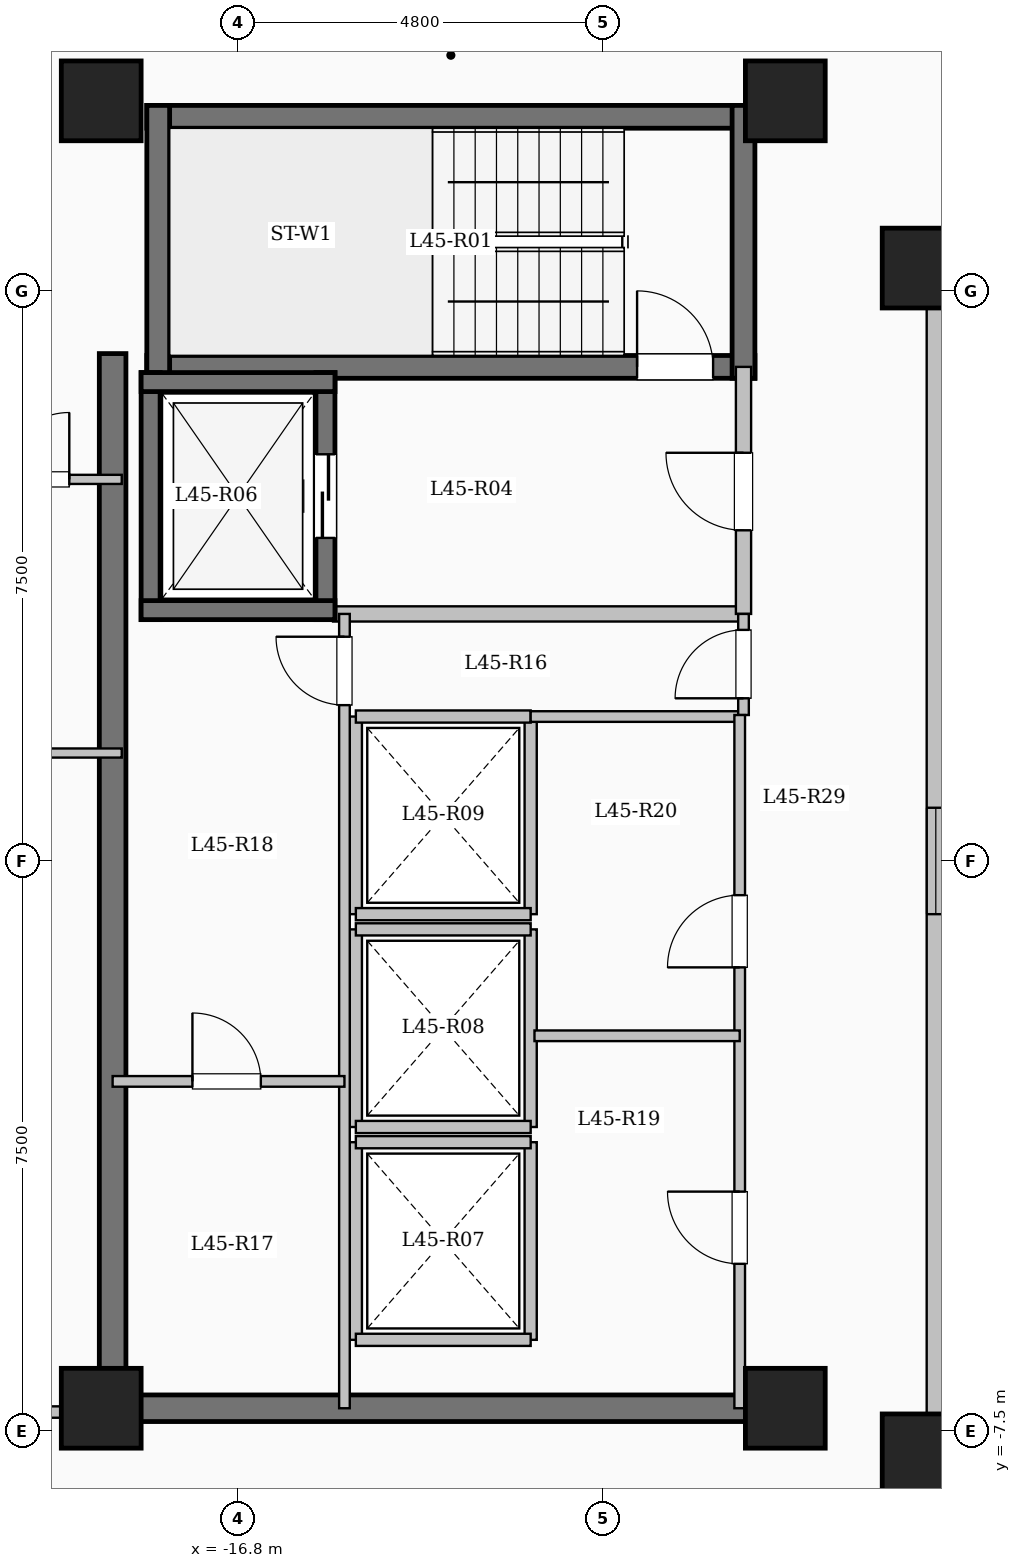
"""IFC4 building model, lengths in metres.
Left out: names, types, materials, properties, quantities, classifications, styles, units other than length and angle.
Written with IfcOpenShell. Run it as: python <this file> out.ifc"""

import sys

from ifc_helpers import new_model, si_unit, direction, frame, frame_2d, origin, origin_2d, place, context, subcontext, project, spatial, rectangle, extrude, element, fill, save


model = new_model("IFC4")
c1 = context("Model", 3, precision=1e-05, world=origin(), true_north=direction((0.0, 1.0)))
c2 = subcontext(c1, "Body", "Model", "MODEL_VIEW")
j1 = project(units=[si_unit("LENGTHUNIT", "METRE"), si_unit("PLANEANGLEUNIT", "RADIAN")], contexts=[c1])
p1 = place(None, origin())
s1 = spatial("IfcSite", under=j1, at=p1, CompositionType="ELEMENT")
p2 = place(p1, origin())
s2 = spatial("IfcBuilding", under=s1, at=p2, CompositionType="ELEMENT")
p3 = place(p2, frame((0.0, 0.0, 166.1)))
s3 = spatial("IfcBuildingStorey", under=s2, at=p3, CompositionType="ELEMENT", Elevation=166.1)
for number, where, z_axis, x_axis in (
    (1, (-7.8, -7.8, 0.0), (0.0, 0.0, 1.0), (1.0, 0.0, 0.0)),
    (2, (-7.8, 7.8, 0.0), (0.0, 0.0, 1.0), (1.0, 0.0, 0.0)),
    (3, (-9.6, -7.2, 0.0), (0.0, 0.0, 1.0), (1.0, 0.0, 0.0)),
    (4, (-9.6, 10.0, 0.0), (0.0, 0.0, 1.0), (1.0, 0.0, 0.0)),
    (5, (-18.6, -7.2, 0.0), (0.0, 0.0, 1.0), (1.0, 0.0, 0.0)),
    (6, (-18.6, 10.0, 0.0), (0.0, 0.0, 1.0), (1.0, 0.0, 0.0)),
):
    element("IfcColumn", number, at=place(p3, frame(where, z_axis=z_axis, x_axis=x_axis)), inside=s3, PredefinedType="COLUMN", context=c2, shape_type="SweptSolid", body=[
        extrude(rectangle(XDim=1.05, YDim=1.05, at=origin_2d()), origin(), (0.0, 0.0, 1.0), 3.35),
    ])
p4 = place(p3, frame((-7.62, -7.62, 0.0), z_axis=(0.0, 0.0, 1.0), x_axis=(1.0, 0.0, 0.0)))
e7 = element("IfcWall", 7, at=p4, inside=s3, PredefinedType="SOLIDWALL", context=c2, shape_type="SweptSolid", body=[
    extrude(rectangle(XDim=15.24, YDim=0.24, at=frame_2d((7.62, 0.0))), origin(), (0.0, 0.0, 1.0), 3.1),
])
p5 = place(p4, frame((6.92, 0.0, 0.95)))
e8 = element("IfcOpeningElement", 8, at=p5, cuts=e7, PredefinedType="OPENING", context=c2, shape_type="SweptSolid", body=[
    extrude(rectangle(XDim=1.4, YDim=1.5, at=frame_2d((0.7, 0.75))), frame((0.0, 0.13, 0.0), z_axis=(0.0, -1.0, 0.0), x_axis=(1.0, 0.0, 0.0)), (0.0, 0.0, 1.0), 0.26),
])
p6 = place(p3, frame((7.62, 7.62, 0.0), z_axis=(0.0, 0.0, 1.0), x_axis=(-1.0, 0.0, 0.0)))
e9 = element("IfcWall", 9, at=p6, inside=s3, PredefinedType="SOLIDWALL", context=c2, shape_type="SweptSolid", body=[
    extrude(rectangle(XDim=15.24, YDim=0.24, at=frame_2d((7.62, 0.0))), origin(), (0.0, 0.0, 1.0), 3.1),
])
p7 = place(p6, frame((6.92, 0.0, 0.95)))
e10 = element("IfcOpeningElement", 10, at=p7, cuts=e9, PredefinedType="OPENING", context=c2, shape_type="SweptSolid", body=[
    extrude(rectangle(XDim=1.4, YDim=1.5, at=frame_2d((0.7, 0.75))), frame((0.0, 0.13, 0.0), z_axis=(0.0, -1.0, 0.0), x_axis=(1.0, 0.0, 0.0)), (0.0, 0.0, 1.0), 0.26),
])
p8 = place(p3, frame((-7.62, 7.62, 0.0), z_axis=(0.0, 0.0, 1.0), x_axis=(0.0, -1.0, 0.0)))
e11 = element("IfcWall", 11, at=p8, inside=s3, PredefinedType="SOLIDWALL", context=c2, shape_type="SweptSolid", body=[
    extrude(rectangle(XDim=15.24, YDim=0.24, at=frame_2d((7.62, 0.0))), origin(), (0.0, 0.0, 1.0), 3.1),
])
p9 = place(p8, frame((6.92, 0.0, 0.95)))
e12 = element("IfcOpeningElement", 12, at=p9, cuts=e11, PredefinedType="OPENING", context=c2, shape_type="SweptSolid", body=[
    extrude(rectangle(XDim=1.4, YDim=1.5, at=frame_2d((0.7, 0.75))), frame((0.0, 0.13, 0.0), z_axis=(0.0, -1.0, 0.0), x_axis=(1.0, 0.0, 0.0)), (0.0, 0.0, 1.0), 0.26),
])
p10 = place(p3, frame((-18.0, 9.79, 0.0), z_axis=(0.0, 0.0, 1.0), x_axis=(1.0, 0.0, 0.0)))
e13 = element("IfcWall", 13, at=p10, inside=s3, PredefinedType="SHEAR", context=c2, shape_type="SweptSolid", body=[
    extrude(rectangle(XDim=8.0, YDim=0.3, at=frame_2d((4.0, 0.0))), origin(), (0.0, 0.0, 1.0), 3.35),
])
p11 = place(p3, frame((-18.0, 6.5, 0.0), z_axis=(0.0, 0.0, 1.0), x_axis=(1.0, 0.0, 0.0)))
e14 = element("IfcWall", 14, at=p11, inside=s3, PredefinedType="SHEAR", context=c2, shape_type="SweptSolid", body=[
    extrude(rectangle(XDim=8.0, YDim=0.3, at=frame_2d((4.0, 0.0))), origin(), (0.0, 0.0, 1.0), 3.35),
])
p12 = place(p11, frame((6.45, 0.0, 0.0)))
e15 = element("IfcOpeningElement", 15, at=p12, cuts=e14, PredefinedType="OPENING", context=c2, shape_type="SweptSolid", body=[
    extrude(rectangle(XDim=1.0, YDim=2.15, at=frame_2d((0.5, 1.075))), frame((0.0, 0.16, 0.0), z_axis=(0.0, -1.0, 0.0), x_axis=(1.0, 0.0, 0.0)), (0.0, 0.0, 1.0), 0.32),
])
for number, where, z_axis, x_axis in (
    (16, (-17.85, 6.35, 0.0), (0.0, 0.0, 1.0), (0.0, 1.0, 0.0)),
    (17, (-10.15, 6.35, 0.0), (0.0, 0.0, 1.0), (0.0, 1.0, 0.0)),
):
    element("IfcWall", number, at=place(p3, frame(where, z_axis=z_axis, x_axis=x_axis)), inside=s3, PredefinedType="SHEAR", context=c2, shape_type="SweptSolid", body=[
        extrude(rectangle(XDim=3.59, YDim=0.3, at=frame_2d((1.795, 0.0))), origin(), (0.0, 0.0, 1.0), 3.35),
    ])
p13 = place(p3, frame((-15.55, 3.25, 0.0), z_axis=(0.0, 0.0, 1.0), x_axis=(1.0, 0.0, 0.0)))
e18 = element("IfcWall", 18, at=p13, inside=s3, PredefinedType="SOLIDWALL", context=c2, shape_type="SweptSolid", body=[
    extrude(rectangle(XDim=5.4, YDim=0.2, at=frame_2d((2.7, 0.0))), origin(), (0.0, 0.0, 1.0), 3.1),
])
p14 = place(p3, frame((-10.15, 3.25, 0.0), z_axis=(0.0, 0.0, 1.0), x_axis=(0.0, 1.0, 0.0)))
e19 = element("IfcWall", 19, at=p14, inside=s3, PredefinedType="SOLIDWALL", context=c2, shape_type="SweptSolid", body=[
    extrude(rectangle(XDim=3.25, YDim=0.2, at=frame_2d((1.625, 0.0))), origin(), (0.0, 0.0, 1.0), 3.1),
])
p15 = place(p14, frame((1.1, 0.0, 0.0)))
e20 = element("IfcOpeningElement", 20, at=p15, cuts=e19, PredefinedType="OPENING", context=c2, shape_type="SweptSolid", body=[
    extrude(rectangle(XDim=1.02, YDim=2.15, at=frame_2d((0.51, 1.075))), frame((0.0, 0.11, 0.0), z_axis=(0.0, -1.0, 0.0), x_axis=(1.0, 0.0, 0.0)), (0.0, 0.0, 1.0), 0.22),
])
p16 = place(p3, frame((-17.95, 3.175, 0.0), z_axis=(0.0, 0.0, 1.0), x_axis=(0.0, 1.0, 0.0)))
e21 = element("IfcWall", 21, at=p16, inside=s3, PredefinedType="SHEAR", context=c2, shape_type="SweptSolid", body=[
    extrude(rectangle(XDim=3.25, YDim=0.25, at=frame_2d((1.625, 0.0))), origin(), (0.0, 0.0, 1.0), 3.35),
])
p17 = place(p3, frame((-15.65, 3.175, 0.0), z_axis=(0.0, 0.0, 1.0), x_axis=(0.0, 1.0, 0.0)))
e22 = element("IfcWall", 22, at=p17, inside=s3, PredefinedType="SHEAR", context=c2, shape_type="SweptSolid", body=[
    extrude(rectangle(XDim=3.25, YDim=0.25, at=frame_2d((1.625, 0.0))), origin(), (0.0, 0.0, 1.0), 3.35),
])
p18 = place(p17, frame((1.075, 0.0, 0.0)))
e23 = element("IfcOpeningElement", 23, at=p18, cuts=e22, PredefinedType="OPENING", context=c2, shape_type="SweptSolid", body=[
    extrude(rectangle(XDim=1.1, YDim=2.15, at=frame_2d((0.55, 1.075))), frame((0.0, 0.135, 0.0), z_axis=(0.0, -1.0, 0.0), x_axis=(1.0, 0.0, 0.0)), (0.0, 0.0, 1.0), 0.27),
])
for number, where, z_axis, x_axis in (
    (24, (-18.075, 3.3, 0.0), (0.0, 0.0, 1.0), (1.0, 0.0, 0.0)),
    (25, (-18.075, 6.3, 0.0), (0.0, 0.0, 1.0), (1.0, 0.0, 0.0)),
):
    element("IfcWall", number, at=place(p3, frame(where, z_axis=z_axis, x_axis=x_axis)), inside=s3, PredefinedType="SHEAR", context=c2, shape_type="SweptSolid", body=[
        extrude(rectangle(XDim=2.55, YDim=0.25, at=frame_2d((1.275, 0.0))), origin(), (0.0, 0.0, 1.0), 3.35),
    ])
for number, where, z_axis, x_axis in (
    (26, (-15.25, -6.3, 0.0), (0.0, 0.0, 1.0), (0.0, 1.0, 0.0)),
    (27, (-12.95, -6.3, 0.0), (0.0, 0.0, 1.0), (0.0, 1.0, 0.0)),
):
    element("IfcWall", number, at=place(p3, frame(where, z_axis=z_axis, x_axis=x_axis)), inside=s3, PredefinedType="SOLIDWALL", context=c2, shape_type="SweptSolid", body=[
        extrude(rectangle(XDim=2.6, YDim=0.16, at=frame_2d((1.3, 0.0))), origin(), (0.0, 0.0, 1.0), 3.1),
    ])
for number, where, z_axis, x_axis in (
    (28, (-15.25, -6.3, 0.0), (0.0, 0.0, 1.0), (1.0, 0.0, 0.0)),
    (29, (-15.25, -3.7, 0.0), (0.0, 0.0, 1.0), (1.0, 0.0, 0.0)),
):
    element("IfcWall", number, at=place(p3, frame(where, z_axis=z_axis, x_axis=x_axis)), inside=s3, PredefinedType="SOLIDWALL", context=c2, shape_type="SweptSolid", body=[
        extrude(rectangle(XDim=2.3, YDim=0.16, at=frame_2d((1.15, 0.0))), origin(), (0.0, 0.0, 1.0), 3.1),
    ])
for number, where, z_axis, x_axis in (
    (30, (-15.25, -3.5, 0.0), (0.0, 0.0, 1.0), (0.0, 1.0, 0.0)),
    (31, (-12.95, -3.5, 0.0), (0.0, 0.0, 1.0), (0.0, 1.0, 0.0)),
):
    element("IfcWall", number, at=place(p3, frame(where, z_axis=z_axis, x_axis=x_axis)), inside=s3, PredefinedType="SOLIDWALL", context=c2, shape_type="SweptSolid", body=[
        extrude(rectangle(XDim=2.6, YDim=0.16, at=frame_2d((1.3, 0.0))), origin(), (0.0, 0.0, 1.0), 3.1),
    ])
for number, where, z_axis, x_axis in (
    (32, (-15.25, -3.5, 0.0), (0.0, 0.0, 1.0), (1.0, 0.0, 0.0)),
    (33, (-15.25, -0.9, 0.0), (0.0, 0.0, 1.0), (1.0, 0.0, 0.0)),
):
    element("IfcWall", number, at=place(p3, frame(where, z_axis=z_axis, x_axis=x_axis)), inside=s3, PredefinedType="SOLIDWALL", context=c2, shape_type="SweptSolid", body=[
        extrude(rectangle(XDim=2.3, YDim=0.16, at=frame_2d((1.15, 0.0))), origin(), (0.0, 0.0, 1.0), 3.1),
    ])
for number, where, z_axis, x_axis in (
    (34, (-15.25, -0.7, 0.0), (0.0, 0.0, 1.0), (0.0, 1.0, 0.0)),
    (35, (-12.95, -0.7, 0.0), (0.0, 0.0, 1.0), (0.0, 1.0, 0.0)),
):
    element("IfcWall", number, at=place(p3, frame(where, z_axis=z_axis, x_axis=x_axis)), inside=s3, PredefinedType="SOLIDWALL", context=c2, shape_type="SweptSolid", body=[
        extrude(rectangle(XDim=2.6, YDim=0.16, at=frame_2d((1.3, 0.0))), origin(), (0.0, 0.0, 1.0), 3.1),
    ])
for number, where, z_axis, x_axis in (
    (36, (-15.25, -0.7, 0.0), (0.0, 0.0, 1.0), (1.0, 0.0, 0.0)),
    (37, (-15.25, 1.9, 0.0), (0.0, 0.0, 1.0), (1.0, 0.0, 0.0)),
):
    element("IfcWall", number, at=place(p3, frame(where, z_axis=z_axis, x_axis=x_axis)), inside=s3, PredefinedType="SOLIDWALL", context=c2, shape_type="SweptSolid", body=[
        extrude(rectangle(XDim=2.3, YDim=0.16, at=frame_2d((1.15, 0.0))), origin(), (0.0, 0.0, 1.0), 3.1),
    ])
p19 = place(p3, frame((-18.45, -7.375, 0.0), z_axis=(0.0, 0.0, 1.0), x_axis=(0.0, 1.0, 0.0)))
e38 = element("IfcWall", 38, at=p19, inside=s3, PredefinedType="SHEAR", context=c2, shape_type="SweptSolid", body=[
    extrude(rectangle(XDim=14.05, YDim=0.35, at=frame_2d((7.025, 0.0))), origin(), (0.0, 0.0, 1.0), 3.35),
])
p20 = place(p3, frame((-18.625, -7.2, 0.0), z_axis=(0.0, 0.0, 1.0), x_axis=(1.0, 0.0, 0.0)))
e39 = element("IfcWall", 39, at=p20, inside=s3, PredefinedType="SHEAR", context=c2, shape_type="SweptSolid", body=[
    extrude(rectangle(XDim=8.55, YDim=0.35, at=frame_2d((4.275, 0.0))), origin(), (0.0, 0.0, 1.0), 3.35),
])
p21 = place(p3, frame((-12.95, 1.9, 0.0), z_axis=(0.0, 0.0, 1.0), x_axis=(1.0, 0.0, 0.0)))
e40 = element("IfcWall", 40, at=p21, inside=s3, PredefinedType="PARTITIONING", context=c2, shape_type="SweptSolid", body=[
    extrude(rectangle(XDim=2.8, YDim=0.14, at=frame_2d((1.4, 0.0))), origin(), (0.0, 0.0, 1.0), 3.1),
])
p22 = place(p3, frame((-10.15, 1.92, 0.0), z_axis=(0.0, 0.0, 1.0), x_axis=(0.0, 1.0, 0.0)))
e41 = element("IfcWall", 41, at=p22, inside=s3, PredefinedType="PARTITIONING", context=c2, shape_type="SweptSolid", body=[
    extrude(rectangle(XDim=1.33, YDim=0.14, at=frame_2d((0.665, 0.0))), origin(), (0.0, 0.0, 1.0), 3.1),
])
p23 = place(p22, frame((0.22, 0.0, 0.0)))
e42 = element("IfcOpeningElement", 42, at=p23, cuts=e41, PredefinedType="OPENING", context=c2, shape_type="SweptSolid", body=[
    extrude(rectangle(XDim=0.9, YDim=2.08, at=frame_2d((0.45, 1.04))), frame((0.0, 0.08, 0.0), z_axis=(0.0, -1.0, 0.0), x_axis=(1.0, 0.0, 0.0)), (0.0, 0.0, 1.0), 0.16),
])
p24 = place(p3, frame((-15.4, -7.2, 0.0), z_axis=(0.0, 0.0, 1.0), x_axis=(0.0, 1.0, 0.0)))
e43 = element("IfcWall", 43, at=p24, inside=s3, PredefinedType="PARTITIONING", context=c2, shape_type="SweptSolid", body=[
    extrude(rectangle(XDim=10.45, YDim=0.14, at=frame_2d((5.225, 0.0))), origin(), (0.0, 0.0, 1.0), 3.1),
])
p25 = place(p24, frame((9.25, 0.0, 0.0)))
e44 = element("IfcOpeningElement", 44, at=p25, cuts=e43, PredefinedType="OPENING", context=c2, shape_type="SweptSolid", body=[
    extrude(rectangle(XDim=0.9, YDim=2.08, at=frame_2d((0.45, 1.04))), frame((0.0, 0.08, 0.0), z_axis=(0.0, -1.0, 0.0), x_axis=(1.0, 0.0, 0.0)), (0.0, 0.0, 1.0), 0.16),
])
p26 = place(p3, frame((-18.45, -2.9, 0.0), z_axis=(0.0, 0.0, 1.0), x_axis=(1.0, 0.0, 0.0)))
e45 = element("IfcWall", 45, at=p26, inside=s3, PredefinedType="PARTITIONING", context=c2, shape_type="SweptSolid", body=[
    extrude(rectangle(XDim=3.05, YDim=0.14, at=frame_2d((1.525, 0.0))), origin(), (0.0, 0.0, 1.0), 3.1),
])
p27 = place(p26, frame((1.05, 0.0, 0.0)))
e46 = element("IfcOpeningElement", 46, at=p27, cuts=e45, PredefinedType="OPENING", context=c2, shape_type="SweptSolid", body=[
    extrude(rectangle(XDim=0.9, YDim=2.08, at=frame_2d((0.45, 1.04))), frame((0.0, 0.08, 0.0), z_axis=(0.0, -1.0, 0.0), x_axis=(1.0, 0.0, 0.0)), (0.0, 0.0, 1.0), 0.16),
])
p28 = place(p3, frame((-10.2, -7.2, 0.0), z_axis=(0.0, 0.0, 1.0), x_axis=(0.0, 1.0, 0.0)))
e47 = element("IfcWall", 47, at=p28, inside=s3, PredefinedType="PARTITIONING", context=c2, shape_type="SweptSolid", body=[
    extrude(rectangle(XDim=9.12, YDim=0.14, at=frame_2d((4.56, 0.0))), origin(), (0.0, 0.0, 1.0), 3.1),
])
p29 = place(p28, frame((1.9, 0.0, 0.0)))
e48 = element("IfcOpeningElement", 48, at=p29, cuts=e47, PredefinedType="OPENING", context=c2, shape_type="SweptSolid", body=[
    extrude(rectangle(XDim=0.95, YDim=2.12, at=frame_2d((0.475, 1.06))), frame((0.0, 0.08, 0.0), z_axis=(0.0, -1.0, 0.0), x_axis=(1.0, 0.0, 0.0)), (0.0, 0.0, 1.0), 0.16),
])
p30 = place(p28, frame((5.8, 0.0, 0.0)))
e49 = element("IfcOpeningElement", 49, at=p30, cuts=e47, PredefinedType="OPENING", context=c2, shape_type="SweptSolid", body=[
    extrude(rectangle(XDim=0.95, YDim=2.12, at=frame_2d((0.475, 1.06))), frame((0.0, 0.08, 0.0), z_axis=(0.0, -1.0, 0.0), x_axis=(1.0, 0.0, 0.0)), (0.0, 0.0, 1.0), 0.16),
])
p31 = place(p3, frame((-12.9, -2.3, 0.0), z_axis=(0.0, 0.0, 1.0), x_axis=(1.0, 0.0, 0.0)))
e50 = element("IfcWall", 50, at=p31, inside=s3, PredefinedType="PARTITIONING", context=c2, shape_type="SweptSolid", body=[
    extrude(rectangle(XDim=2.7, YDim=0.14, at=frame_2d((1.35, 0.0))), origin(), (0.0, 0.0, 1.0), 3.1),
])
p32 = place(p3, frame((-25.08, -7.25, 0.0), z_axis=(0.0, 0.0, 1.0), x_axis=(1.0, 0.0, 0.0)))
e51 = element("IfcWall", 51, at=p32, inside=s3, PredefinedType="PARTITIONING", context=c2, shape_type="SweptSolid", body=[
    extrude(rectangle(XDim=6.63, YDim=0.15, at=frame_2d((3.315, 0.0))), origin(), (0.0, 0.0, 1.0), 3.1),
])
p33 = place(p32, frame((3.53, 0.0, 0.0)))
e52 = element("IfcOpeningElement", 52, at=p33, cuts=e51, PredefinedType="OPENING", context=c2, shape_type="SweptSolid", body=[
    extrude(rectangle(XDim=0.96, YDim=2.15, at=frame_2d((0.48, 1.075))), frame((0.0, 0.085, 0.0), z_axis=(0.0, -1.0, 0.0), x_axis=(1.0, 0.0, 0.0)), (0.0, 0.0, 1.0), 0.17),
])
p34 = place(p3, frame((-25.2, 1.42, 0.0), z_axis=(0.0, 0.0, 1.0), x_axis=(1.0, 0.0, 0.0)))
e53 = element("IfcWall", 53, at=p34, inside=s3, PredefinedType="PARTITIONING", context=c2, shape_type="SweptSolid", body=[
    extrude(rectangle(XDim=6.87, YDim=0.12, at=frame_2d((3.435, 0.0))), origin(), (0.0, 0.0, 1.0), 3.1),
])
p35 = place(p34, frame((1.312, 0.0, 0.0)))
e54 = element("IfcOpeningElement", 54, at=p35, cuts=e53, PredefinedType="OPENING", context=c2, shape_type="SweptSolid", body=[
    extrude(rectangle(XDim=0.88, YDim=2.1, at=frame_2d((0.44, 1.05))), frame((0.0, 0.07, 0.0), z_axis=(0.0, -1.0, 0.0), x_axis=(1.0, 0.0, 0.0)), (0.0, 0.0, 1.0), 0.14),
])
p36 = place(p34, frame((4.577, 0.0, 0.0)))
e55 = element("IfcOpeningElement", 55, at=p36, cuts=e53, PredefinedType="OPENING", context=c2, shape_type="SweptSolid", body=[
    extrude(rectangle(XDim=0.88, YDim=2.1, at=frame_2d((0.44, 1.05))), frame((0.0, 0.07, 0.0), z_axis=(0.0, -1.0, 0.0), x_axis=(1.0, 0.0, 0.0)), (0.0, 0.0, 1.0), 0.14),
])
p37 = place(p3, frame((-25.2, 5.02, 0.0), z_axis=(0.0, 0.0, 1.0), x_axis=(1.0, 0.0, 0.0)))
e56 = element("IfcWall", 56, at=p37, inside=s3, PredefinedType="PARTITIONING", context=c2, shape_type="SweptSolid", body=[
    extrude(rectangle(XDim=6.87, YDim=0.12, at=frame_2d((3.435, 0.0))), origin(), (0.0, 0.0, 1.0), 3.1),
])
p38 = place(p37, frame((5.3, 0.0, 0.0)))
e57 = element("IfcOpeningElement", 57, at=p38, cuts=e56, PredefinedType="OPENING", context=c2, shape_type="SweptSolid", body=[
    extrude(rectangle(XDim=0.88, YDim=2.1, at=frame_2d((0.44, 1.05))), frame((0.0, 0.07, 0.0), z_axis=(0.0, -1.0, 0.0), x_axis=(1.0, 0.0, 0.0)), (0.0, 0.0, 1.0), 0.14),
])
p39 = place(p9, origin())
e58 = element("IfcWindow", 58, at=p39, inside=s3, PartitioningType="SINGLE_PANEL", PredefinedType="WINDOW", context=c2, shape_type="SweptSolid", body=[
    extrude(rectangle(XDim=1.4, YDim=1.5, at=frame_2d((0.7, 0.75))), frame((0.0, 0.03, 0.0), z_axis=(0.0, -1.0, 0.0), x_axis=(1.0, 0.0, 0.0)), (0.0, 0.0, 1.0), 0.06),
])
fill(e12, e58)
p40 = place(p12, origin())
e59 = element("IfcDoor", 59, at=p40, inside=s3, OperationType="SINGLE_SWING_LEFT", PredefinedType="DOOR", context=c2, shape_type="SweptSolid", body=[
    extrude(rectangle(XDim=1.0, YDim=2.15, at=frame_2d((0.5, 1.075))), frame((0.0, 0.025, 0.0), z_axis=(0.0, -1.0, 0.0), x_axis=(1.0, 0.0, 0.0)), (0.0, 0.0, 1.0), 0.05),
])
fill(e15, e59)
p41 = place(p15, origin())
e60 = element("IfcDoor", 60, at=p41, inside=s3, OperationType="SINGLE_SWING_RIGHT", PredefinedType="DOOR", context=c2, shape_type="SweptSolid", body=[
    extrude(rectangle(XDim=1.02, YDim=2.15, at=frame_2d((0.51, 1.075))), frame((0.0, 0.025, 0.0), z_axis=(0.0, -1.0, 0.0), x_axis=(1.0, 0.0, 0.0)), (0.0, 0.0, 1.0), 0.05),
])
fill(e20, e60)
p42 = place(p18, origin())
e61 = element("IfcDoor", 61, at=p42, inside=s3, OperationType="SLIDING_TO_LEFT", PredefinedType="DOOR", context=c2, shape_type="SweptSolid", body=[
    extrude(rectangle(XDim=1.1, YDim=2.15, at=frame_2d((0.55, 1.075))), frame((0.0, 0.025, 0.0), z_axis=(0.0, -1.0, 0.0), x_axis=(1.0, 0.0, 0.0)), (0.0, 0.0, 1.0), 0.05),
])
fill(e23, e61)
p43 = place(p23, origin())
e62 = element("IfcDoor", 62, at=p43, inside=s3, OperationType="SINGLE_SWING_LEFT", PredefinedType="DOOR", context=c2, shape_type="SweptSolid", body=[
    extrude(rectangle(XDim=0.9, YDim=2.08, at=frame_2d((0.45, 1.04))), frame((0.0, 0.025, 0.0), z_axis=(0.0, -1.0, 0.0), x_axis=(1.0, 0.0, 0.0)), (0.0, 0.0, 1.0), 0.05),
])
fill(e42, e62)
p44 = place(p25, origin())
e63 = element("IfcDoor", 63, at=p44, inside=s3, OperationType="SINGLE_SWING_RIGHT", PredefinedType="DOOR", context=c2, shape_type="SweptSolid", body=[
    extrude(rectangle(XDim=0.9, YDim=2.08, at=frame_2d((0.45, 1.04))), frame((0.0, 0.025, 0.0), z_axis=(0.0, -1.0, 0.0), x_axis=(1.0, 0.0, 0.0)), (0.0, 0.0, 1.0), 0.05),
])
fill(e44, e63)
p45 = place(p27, origin())
e64 = element("IfcDoor", 64, at=p45, inside=s3, OperationType="SINGLE_SWING_LEFT", PredefinedType="DOOR", context=c2, shape_type="SweptSolid", body=[
    extrude(rectangle(XDim=0.9, YDim=2.08, at=frame_2d((0.45, 1.04))), frame((0.0, 0.025, 0.0), z_axis=(0.0, -1.0, 0.0), x_axis=(1.0, 0.0, 0.0)), (0.0, 0.0, 1.0), 0.05),
])
fill(e46, e64)
p46 = place(p29, origin())
e65 = element("IfcDoor", 65, at=p46, inside=s3, OperationType="SINGLE_SWING_RIGHT", PredefinedType="DOOR", context=c2, shape_type="SweptSolid", body=[
    extrude(rectangle(XDim=0.95, YDim=2.12, at=frame_2d((0.475, 1.06))), frame((0.0, 0.025, 0.0), z_axis=(0.0, -1.0, 0.0), x_axis=(1.0, 0.0, 0.0)), (0.0, 0.0, 1.0), 0.05),
])
fill(e48, e65)
p47 = place(p30, origin())
e66 = element("IfcDoor", 66, at=p47, inside=s3, OperationType="SINGLE_SWING_LEFT", PredefinedType="DOOR", context=c2, shape_type="SweptSolid", body=[
    extrude(rectangle(XDim=0.95, YDim=2.12, at=frame_2d((0.475, 1.06))), frame((0.0, 0.025, 0.0), z_axis=(0.0, -1.0, 0.0), x_axis=(1.0, 0.0, 0.0)), (0.0, 0.0, 1.0), 0.05),
])
fill(e49, e66)
p48 = place(p38, origin())
e67 = element("IfcDoor", 67, at=p48, inside=s3, OperationType="SINGLE_SWING_RIGHT", PredefinedType="DOOR", context=c2, shape_type="SweptSolid", body=[
    extrude(rectangle(XDim=0.88, YDim=2.1, at=frame_2d((0.44, 1.05))), frame((0.0, 0.025, 0.0), z_axis=(0.0, -1.0, 0.0), x_axis=(1.0, 0.0, 0.0)), (0.0, 0.0, 1.0), 0.05),
])
fill(e57, e67)
save(model, sys.argv[1])
